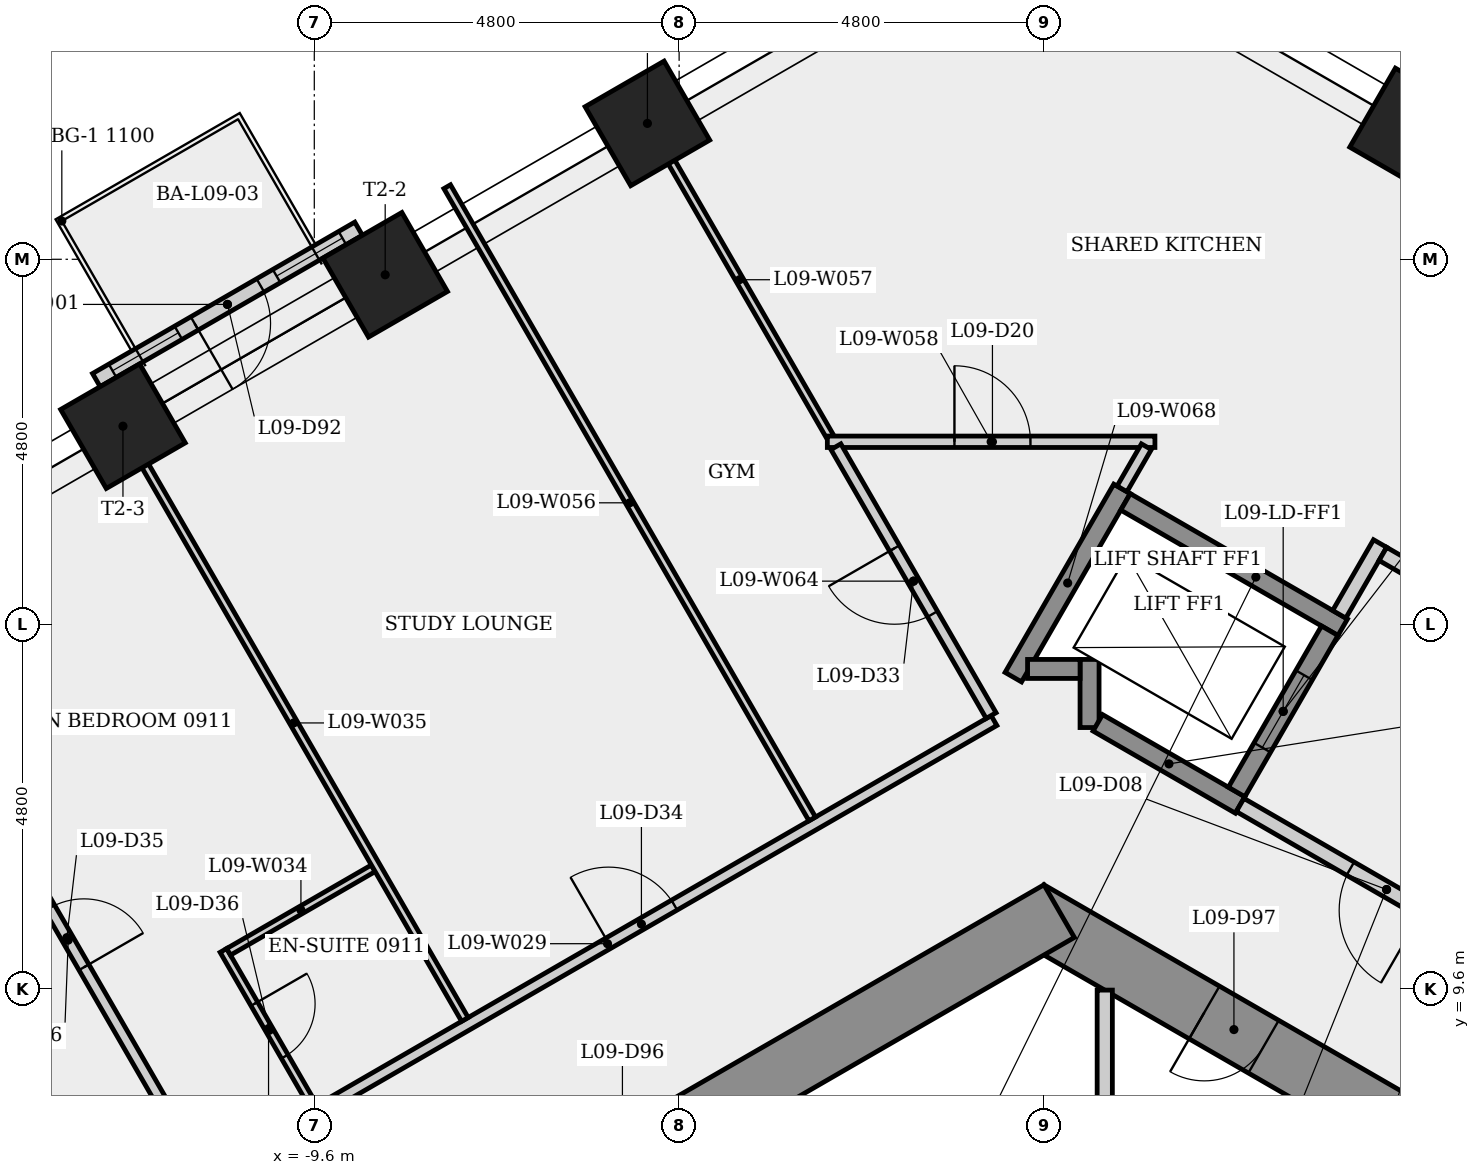
"""IFC4 building model, lengths in metres.
Left out: names, types, materials, properties, quantities, classifications, styles, units other than length and angle.
Written with IfcOpenShell. Run it as: python <this file> out.ifc"""

import sys

from ifc_helpers import new_model, si_unit, direction, frame, frame_2d, origin, origin_2d, place, context, subcontext, project, spatial, rectangle, extrude, element, fill, save


model = new_model("IFC4")
c1 = context("Model", 3, precision=1e-05, world=origin(), true_north=direction((0.0, 1.0)))
c2 = subcontext(c1, "Body", "Model", "MODEL_VIEW")
j1 = project(units=[si_unit("LENGTHUNIT", "METRE"), si_unit("PLANEANGLEUNIT", "RADIAN")], contexts=[c1])
p1 = place(None, origin())
s1 = spatial("IfcSite", under=j1, at=p1, CompositionType="ELEMENT")
p2 = place(p1, origin())
s2 = spatial("IfcBuilding", under=s1, at=p2, CompositionType="ELEMENT")
p3 = place(p2, frame((0.0, 0.0, 39.1)))
s3 = spatial("IfcBuildingStorey", under=s2, at=p3, CompositionType="ELEMENT", Elevation=39.1)
p4 = place(p3, frame((9.3, 5.138, 0.0), z_axis=(0.0, 0.0, 1.0), x_axis=(-0.866023993627, 0.500002442456, 0.0)))
e1 = element("IfcWall", 1, at=p4, inside=s3, PredefinedType="SHEAR", context=c2, shape_type="SweptSolid", body=[
    extrude(rectangle(XDim=10.97, YDim=0.8, at=frame_2d((5.485, 0.0))), origin(), (0.0, 0.0, 1.0), 3.4),
])
p5 = place(p4, frame((7.403, 0.0, 0.0)))
e2 = element("IfcOpeningElement", 2, at=p5, cuts=e1, PredefinedType="OPENING", context=c2, shape_type="SweptSolid", body=[
    extrude(rectangle(XDim=0.9, YDim=2.1, at=frame_2d((0.45, 1.05))), frame((0.0, 0.41, 0.0), z_axis=(0.0, -1.0, 0.0), x_axis=(1.0, 0.0, 0.0)), (0.0, 0.0, 1.0), 0.82),
])
p6 = place(p4, frame((0.78, 0.0, 0.0)))
e3 = element("IfcOpeningElement", 3, at=p6, cuts=e1, PredefinedType="OPENING", context=c2, shape_type="SweptSolid", body=[
    extrude(rectangle(XDim=0.9, YDim=2.1, at=frame_2d((0.45, 1.05))), frame((0.0, 0.41, 0.0), z_axis=(0.0, -1.0, 0.0), x_axis=(1.0, 0.0, 0.0)), (0.0, 0.0, 1.0), 0.82),
])
p7 = place(p3, frame((0.2, 10.623, 0.0), z_axis=(0.0, 0.0, 1.0), x_axis=(-0.866023993627, -0.500002442456, 0.0)))
e4 = element("IfcWall", 4, at=p7, inside=s3, PredefinedType="SHEAR", context=c2, shape_type="SweptSolid", body=[
    extrude(rectangle(XDim=10.97, YDim=0.8, at=frame_2d((5.485, 0.0))), origin(), (0.0, 0.0, 1.0), 3.4),
])
p8 = place(p7, frame((6.185, 0.0, 0.0)))
e5 = element("IfcOpeningElement", 5, at=p8, cuts=e4, PredefinedType="OPENING", context=c2, shape_type="SweptSolid", body=[
    extrude(rectangle(XDim=0.9, YDim=2.1, at=frame_2d((0.45, 1.05))), frame((0.0, 0.41, 0.0), z_axis=(0.0, -1.0, 0.0), x_axis=(1.0, 0.0, 0.0)), (0.0, 0.0, 1.0), 0.82),
])
for number, where, z_axis, x_axis in (
    (6, (4.843, 20.895, 0.0), (0.0, 0.0, 1.0), (0.5, 0.866, 0.0)),
    (7, (-5.217, 20.988, 0.0), (0.0, 0.0, 1.0), (-0.5, 0.866, 0.0)),
    (8, (-8.667, 18.996, 0.0), (0.0, 0.0, 1.0), (-0.5, 0.866, 0.0)),
    (9, (-12.117, 17.004, 0.0), (0.0, 0.0, 1.0), (-0.5, 0.866, 0.0)),
):
    element("IfcColumn", number, at=place(p3, frame(where, z_axis=z_axis, x_axis=x_axis)), inside=s3, PredefinedType="COLUMN", context=c2, shape_type="SweptSolid", body=[
        extrude(rectangle(XDim=1.2, YDim=1.2, at=origin_2d()), origin(), (0.0, 0.0, 1.0), 3.4),
    ])
p9 = place(p3, frame((-9.017, 19.602, 0.0), z_axis=(0.0, 0.0, 1.0), x_axis=(-0.866017214255, -0.500014184414, 0.0)))
e10 = element("IfcWall", 10, at=p9, inside=s3, PredefinedType="SOLIDWALL", context=c2, shape_type="SweptSolid", body=[
    extrude(rectangle(XDim=3.984, YDim=0.2, at=frame_2d((1.992, 0.0))), origin(), (0.0, 0.0, 1.0), 3.4),
])
p10 = place(p9, frame((1.492, 0.0, 0.0)))
e11 = element("IfcOpeningElement", 11, at=p10, cuts=e10, PredefinedType="OPENING", context=c2, shape_type="SweptSolid", body=[
    extrude(rectangle(XDim=1.0, YDim=2.4, at=frame_2d((0.5, 1.2))), frame((0.0, 0.11, 0.0), z_axis=(0.0, -1.0, 0.0), x_axis=(1.0, 0.0, 0.0)), (0.0, 0.0, 1.0), 0.22),
])
p11 = place(p9, frame((0.246, 0.0, 0.9)))
e12 = element("IfcOpeningElement", 12, at=p11, cuts=e10, PredefinedType="OPENING", context=c2, shape_type="SweptSolid", body=[
    extrude(rectangle(XDim=1.0, YDim=1.5, at=frame_2d((0.5, 0.75))), frame((0.0, 0.11, 0.0), z_axis=(0.0, -1.0, 0.0), x_axis=(1.0, 0.0, 0.0)), (0.0, 0.0, 1.0), 0.22),
])
p12 = place(p9, frame((2.738, 0.0, 0.9)))
e13 = element("IfcOpeningElement", 13, at=p12, cuts=e10, PredefinedType="OPENING", context=c2, shape_type="SweptSolid", body=[
    extrude(rectangle(XDim=1.0, YDim=1.5, at=frame_2d((0.5, 0.75))), frame((0.0, 0.11, 0.0), z_axis=(0.0, -1.0, 0.0), x_axis=(1.0, 0.0, 0.0)), (0.0, 0.0, 1.0), 0.22),
])
p13 = place(p3, frame((-14.509, 13.138, 0.0), z_axis=(0.0, 0.0, 1.0), x_axis=(0.499975272495, -0.866039679746, 0.0)))
e14 = element("IfcWall", 14, at=p13, inside=s3, PredefinedType="PARTITIONING", context=c2, shape_type="SweptSolid", body=[
    extrude(rectangle(XDim=6.687, YDim=0.15, at=frame_2d((3.344, 0.0))), origin(), (0.0, 0.0, 1.0), 3.05),
])
p14 = place(p13, frame((2.856, 0.0, 0.0)))
e15 = element("IfcOpeningElement", 15, at=p14, cuts=e14, PredefinedType="OPENING", context=c2, shape_type="SweptSolid", body=[
    extrude(rectangle(XDim=0.9, YDim=2.1, at=frame_2d((0.45, 1.05))), frame((0.0, 0.085, 0.0), z_axis=(0.0, -1.0, 0.0), x_axis=(1.0, 0.0, 0.0)), (0.0, 0.0, 1.0), 0.17),
])
p15 = place(p3, frame((-10.828, 7.259, 0.0), z_axis=(0.0, 0.0, 1.0), x_axis=(0.866023917287, 0.50000257468, 0.0)))
e16 = element("IfcWall", 16, at=p15, inside=s3, PredefinedType="PARTITIONING", context=c2, shape_type="SweptSolid", body=[
    extrude(rectangle(XDim=11.744, YDim=0.15, at=frame_2d((5.872, 0.0))), origin(), (0.0, 0.0, 1.0), 3.05),
])
p16 = place(p15, frame((5.887, 0.0, 0.0)))
e17 = element("IfcOpeningElement", 17, at=p16, cuts=e16, PredefinedType="OPENING", context=c2, shape_type="SweptSolid", body=[
    extrude(rectangle(XDim=1.0, YDim=2.1, at=frame_2d((0.5, 1.05))), frame((0.0, 0.085, 0.0), z_axis=(0.0, -1.0, 0.0), x_axis=(1.0, 0.0, 0.0)), (0.0, 0.0, 1.0), 0.17),
])
p17 = place(p3, frame((-10.796, 10.106, 0.0), z_axis=(0.0, 0.0, 1.0), x_axis=(0.499986429846, -0.866033238375, 0.0)))
e18 = element("IfcWall", 18, at=p17, inside=s3, PredefinedType="PARTITIONING", context=c2, shape_type="SweptSolid", body=[
    extrude(rectangle(XDim=2.375, YDim=0.1, at=frame_2d((1.188, 0.0))), origin(), (0.0, 0.0, 1.0), 3.05),
])
p18 = place(p17, frame((0.812, 0.0, 0.0)))
e19 = element("IfcOpeningElement", 19, at=p18, cuts=e18, PredefinedType="OPENING", context=c2, shape_type="SweptSolid", body=[
    extrude(rectangle(XDim=0.8, YDim=2.1, at=frame_2d((0.4, 1.05))), frame((0.0, 0.06, 0.0), z_axis=(0.0, -1.0, 0.0), x_axis=(1.0, 0.0, 0.0)), (0.0, 0.0, 1.0), 0.12),
])
p19 = place(p3, frame((-8.824, 11.187, 0.0), z_axis=(0.0, 0.0, 1.0), x_axis=(-0.866046828231, -0.499962889934, 0.0)))
e20 = element("IfcWall", 20, at=p19, inside=s3, PredefinedType="PARTITIONING", context=c2, shape_type="SweptSolid", body=[
    extrude(rectangle(XDim=2.198, YDim=0.1, at=frame_2d((1.099, 0.0))), origin(), (0.0, 0.0, 1.0), 3.05),
])
p20 = place(p3, frame((-12.123, 17.0, 0.0), z_axis=(0.0, 0.0, 1.0), x_axis=(0.500009404554, -0.866019973994, 0.0)))
e21 = element("IfcWall", 21, at=p20, inside=s3, PredefinedType="PARTITIONING", context=c2, shape_type="SweptSolid", body=[
    extrude(rectangle(XDim=9.01, YDim=0.1, at=frame_2d((4.505, 0.0))), origin(), (0.0, 0.0, 1.0), 3.05),
])
p21 = place(p3, frame((-3.049, 11.836, 0.0), z_axis=(0.0, 0.0, 1.0), x_axis=(-0.500018000043, 0.866015011206, 0.0)))
e22 = element("IfcWall", 22, at=p21, inside=s3, PredefinedType="PARTITIONING", context=c2, shape_type="SweptSolid", body=[
    extrude(rectangle(XDim=9.606, YDim=0.1, at=frame_2d((4.803, 0.0))), origin(), (0.0, 0.0, 1.0), 3.05),
])
p22 = place(p3, frame((-2.812, 16.864, 0.0), z_axis=(0.0, 0.0, 1.0), x_axis=(-0.49998363006, 0.866034854768, 0.0)))
e23 = element("IfcWall", 23, at=p22, inside=s3, PredefinedType="PARTITIONING", context=c2, shape_type="SweptSolid", body=[
    extrude(rectangle(XDim=4.774, YDim=0.1, at=frame_2d((2.387, 0.0))), origin(), (0.0, 0.0, 1.0), 3.05),
])
p23 = place(p3, frame((-2.85, 16.799, 0.0), z_axis=(0.0, 0.0, 1.0), x_axis=(1.0, 0.0, 0.0)))
e24 = element("IfcWall", 24, at=p23, inside=s3, PredefinedType="PARTITIONING", context=c2, shape_type="SweptSolid", body=[
    extrude(rectangle(XDim=4.31, YDim=0.15, at=frame_2d((2.155, 0.0))), origin(), (0.0, 0.0, 1.0), 3.05),
])
p24 = place(p23, frame((1.672, 0.0, 0.0)))
e25 = element("IfcOpeningElement", 25, at=p24, cuts=e24, PredefinedType="OPENING", context=c2, shape_type="SweptSolid", body=[
    extrude(rectangle(XDim=1.0, YDim=2.1, at=frame_2d((0.5, 1.05))), frame((0.0, 0.085, 0.0), z_axis=(0.0, -1.0, 0.0), x_axis=(1.0, 0.0, 0.0)), (0.0, 0.0, 1.0), 0.17),
])
p25 = place(p3, frame((-0.695, 13.196, 0.0), z_axis=(0.0, 0.0, 1.0), x_axis=(-0.49996389635, 0.866046247233, 0.0)))
e26 = element("IfcWall", 26, at=p25, inside=s3, PredefinedType="PARTITIONING", context=c2, shape_type="SweptSolid", body=[
    extrude(rectangle(XDim=4.085, YDim=0.15, at=frame_2d((2.042, 0.0))), origin(), (0.0, 0.0, 1.0), 3.05),
])
p26 = place(p25, frame((1.542, 0.0, 0.0)))
e27 = element("IfcOpeningElement", 27, at=p26, cuts=e26, PredefinedType="OPENING", context=c2, shape_type="SweptSolid", body=[
    extrude(rectangle(XDim=1.0, YDim=2.1, at=frame_2d((0.5, 1.05))), frame((0.0, 0.085, 0.0), z_axis=(0.0, -1.0, 0.0), x_axis=(1.0, 0.0, 0.0)), (0.0, 0.0, 1.0), 0.17),
])
p27 = place(p3, frame((-0.403, 13.702, 0.0), z_axis=(0.0, 0.0, 1.0), x_axis=(0.499976111731, 0.866039195244, 0.0)))
e28 = element("IfcWall", 28, at=p27, inside=s3, PredefinedType="SHEAR", context=c2, shape_type="SweptSolid", body=[
    extrude(rectangle(XDim=2.861, YDim=0.25, at=frame_2d((1.43, 0.0))), origin(), (0.0, 0.0, 1.0), 3.05),
])
p28 = place(p3, frame((0.6, 13.039, 0.0), z_axis=(0.0, 0.0, 1.0), x_axis=(0.0, 1.0, 0.0)))
e29 = element("IfcWall", 29, at=p28, inside=s3, PredefinedType="SHEAR", context=c2, shape_type="SweptSolid", body=[
    extrude(rectangle(XDim=0.896, YDim=0.25, at=frame_2d((0.448, 0.0))), origin(), (0.0, 0.0, 1.0), 3.05),
])
p29 = place(p3, frame((0.475, 13.81, 0.0), z_axis=(0.0, 0.0, 1.0), x_axis=(-1.0, 0.0, 0.0)))
e30 = element("IfcWall", 30, at=p29, inside=s3, PredefinedType="SHEAR", context=c2, shape_type="SweptSolid", body=[
    extrude(rectangle(XDim=0.691, YDim=0.25, at=frame_2d((0.345, 0.0))), origin(), (0.0, 0.0, 1.0), 3.4),
])
p30 = place(p3, frame((0.8, 9.584, 0.0), z_axis=(0.0, 0.0, 1.0), x_axis=(0.0, -1.0, 0.0)))
e31 = element("IfcWall", 31, at=p30, inside=s3, PredefinedType="PARTITIONING", context=c2, shape_type="SweptSolid", body=[
    extrude(rectangle(XDim=4.309, YDim=0.2, at=frame_2d((2.155, 0.0))), origin(), (0.0, 0.0, 1.0), 3.05),
])
p31 = place(p3, frame((1.073, 16.008, 0.0), z_axis=(0.0, 0.0, 1.0), x_axis=(0.866040211805, -0.499974350878, 0.0)))
e32 = element("IfcWall", 32, at=p31, inside=s3, PredefinedType="SHEAR", context=c2, shape_type="SweptSolid", body=[
    extrude(rectangle(XDim=3.3, YDim=0.25, at=frame_2d((1.65, 0.0))), origin(), (0.0, 0.0, 1.0), 3.05),
])
p32 = place(p3, frame((1.347, 16.734, 0.0), z_axis=(0.0, 0.0, 1.0), x_axis=(-0.499909361484, -0.866077727632, 0.0)))
e33 = element("IfcWall", 33, at=p32, inside=s3, PredefinedType="PARTITIONING", context=c2, shape_type="SweptSolid", body=[
    extrude(rectangle(XDim=0.641, YDim=0.15, at=frame_2d((0.32, 0.0))), origin(), (0.0, 0.0, 1.0), 3.05),
])
p33 = place(p3, frame((2.581, 12.02, 0.0), z_axis=(0.0, 0.0, 1.0), x_axis=(-0.86603892542, 0.499976579108, 0.0)))
e34 = element("IfcWall", 34, at=p33, inside=s3, PredefinedType="SHEAR", context=c2, shape_type="SweptSolid", body=[
    extrude(rectangle(XDim=2.162, YDim=0.25, at=frame_2d((1.081, 0.0))), origin(), (0.0, 0.0, 1.0), 3.05),
])
p34 = place(p3, frame((2.535, 12.191, 0.0), z_axis=(0.0, 0.0, 1.0), x_axis=(0.500061746146, 0.865989751695, 0.0)))
e35 = element("IfcWall", 35, at=p34, inside=s3, PredefinedType="SHEAR", context=c2, shape_type="SweptSolid", body=[
    extrude(rectangle(XDim=2.45, YDim=0.25, at=frame_2d((1.225, 0.0))), origin(), (0.0, 0.0, 1.0), 3.4),
])
p35 = place(p34, frame((0.675, 0.0, 0.0)))
e36 = element("IfcOpeningElement", 36, at=p35, cuts=e35, PredefinedType="OPENING", context=c2, shape_type="SweptSolid", body=[
    extrude(rectangle(XDim=1.1, YDim=2.1, at=frame_2d((0.55, 1.05))), frame((0.0, 0.135, 0.0), z_axis=(0.0, -1.0, 0.0), x_axis=(1.0, 0.0, 0.0)), (0.0, 0.0, 1.0), 0.27),
])
p36 = place(p3, frame((3.885, 14.529, 0.0), z_axis=(0.0, 0.0, 1.0), x_axis=(0.499997628298, 0.866026773083, 0.0)))
e37 = element("IfcWall", 37, at=p36, inside=s3, PredefinedType="PARTITIONING", context=c2, shape_type="SweptSolid", body=[
    extrude(rectangle(XDim=1.075, YDim=0.2, at=frame_2d((0.538, 0.0))), origin(), (0.0, 0.0, 1.0), 3.05),
])
p37 = place(p3, frame((4.459, 15.323, 0.0), z_axis=(0.0, 0.0, 1.0), x_axis=(0.866016039709, -0.500016218704, 0.0)))
e38 = element("IfcWall", 38, at=p37, inside=s3, PredefinedType="PARTITIONING", context=c2, shape_type="SweptSolid", body=[
    extrude(rectangle(XDim=4.7, YDim=0.2, at=frame_2d((2.35, 0.0))), origin(), (0.0, 0.0, 1.0), 3.05),
])
p38 = place(p3, frame((6.435, 9.795, 0.0), z_axis=(0.0, 0.0, 1.0), x_axis=(-0.866012907634, 0.500021643343, 0.0)))
e39 = element("IfcWall", 39, at=p38, inside=s3, PredefinedType="PARTITIONING", context=c2, shape_type="SweptSolid", body=[
    extrude(rectangle(XDim=4.45, YDim=0.2, at=frame_2d((2.225, 0.0))), origin(), (0.0, 0.0, 1.0), 3.05),
])
p39 = place(p38, frame((1.675, 0.0, 0.0)))
e40 = element("IfcOpeningElement", 40, at=p39, cuts=e39, PredefinedType="OPENING", context=c2, shape_type="SweptSolid", body=[
    extrude(rectangle(XDim=1.1, YDim=2.1, at=frame_2d((0.55, 1.05))), frame((0.0, 0.11, 0.0), z_axis=(0.0, -1.0, 0.0), x_axis=(1.0, 0.0, 0.0)), (0.0, 0.0, 1.0), 0.22),
])
p40 = place(p10, origin())
e41 = element("IfcDoor", 41, at=p40, inside=s3, OperationType="SINGLE_SWING_RIGHT", PredefinedType="DOOR", context=c2, shape_type="SweptSolid", body=[
    extrude(rectangle(XDim=1.0, YDim=2.4, at=frame_2d((0.5, 1.2))), frame((0.0, 0.025, 0.0), z_axis=(0.0, -1.0, 0.0), x_axis=(1.0, 0.0, 0.0)), (0.0, 0.0, 1.0), 0.05),
])
fill(e11, e41)
p41 = place(p11, origin())
e42 = element("IfcWindow", 42, at=p41, inside=s3, PartitioningType="SINGLE_PANEL", PredefinedType="WINDOW", context=c2, shape_type="SweptSolid", body=[
    extrude(rectangle(XDim=1.0, YDim=1.5, at=frame_2d((0.5, 0.75))), frame((0.0, 0.03, 0.0), z_axis=(0.0, -1.0, 0.0), x_axis=(1.0, 0.0, 0.0)), (0.0, 0.0, 1.0), 0.06),
])
fill(e12, e42)
p42 = place(p12, origin())
e43 = element("IfcWindow", 43, at=p42, inside=s3, PartitioningType="SINGLE_PANEL", PredefinedType="WINDOW", context=c2, shape_type="SweptSolid", body=[
    extrude(rectangle(XDim=1.0, YDim=1.5, at=frame_2d((0.5, 0.75))), frame((0.0, 0.03, 0.0), z_axis=(0.0, -1.0, 0.0), x_axis=(1.0, 0.0, 0.0)), (0.0, 0.0, 1.0), 0.06),
])
fill(e13, e43)
p43 = place(p39, origin())
e44 = element("IfcDoor", 44, at=p43, inside=s3, OperationType="SINGLE_SWING_LEFT", PredefinedType="DOOR", context=c2, shape_type="SweptSolid", body=[
    extrude(rectangle(XDim=1.1, YDim=2.1, at=frame_2d((0.55, 1.05))), frame((0.0, 0.025, 0.0), z_axis=(0.0, -1.0, 0.0), x_axis=(1.0, 0.0, 0.0)), (0.0, 0.0, 1.0), 0.05),
])
fill(e40, e44)
p44 = place(p35, origin())
e45 = element("IfcDoor", 45, at=p44, inside=s3, OperationType="SLIDING_TO_LEFT", PredefinedType="DOOR", context=c2, shape_type="SweptSolid", body=[
    extrude(rectangle(XDim=1.1, YDim=2.1, at=frame_2d((0.55, 1.05))), frame((0.0, 0.025, 0.0), z_axis=(0.0, -1.0, 0.0), x_axis=(1.0, 0.0, 0.0)), (0.0, 0.0, 1.0), 0.05),
])
fill(e36, e45)
p45 = place(p24, origin())
e46 = element("IfcDoor", 46, at=p45, inside=s3, OperationType="SINGLE_SWING_LEFT", PredefinedType="DOOR", context=c2, shape_type="SweptSolid", body=[
    extrude(rectangle(XDim=1.0, YDim=2.1, at=frame_2d((0.5, 1.05))), frame((0.0, 0.025, 0.0), z_axis=(0.0, -1.0, 0.0), x_axis=(1.0, 0.0, 0.0)), (0.0, 0.0, 1.0), 0.05),
])
fill(e25, e46)
p46 = place(p26, origin())
e47 = element("IfcDoor", 47, at=p46, inside=s3, OperationType="SINGLE_SWING_RIGHT", PredefinedType="DOOR", context=c2, shape_type="SweptSolid", body=[
    extrude(rectangle(XDim=1.0, YDim=2.1, at=frame_2d((0.5, 1.05))), frame((0.0, 0.025, 0.0), z_axis=(0.0, -1.0, 0.0), x_axis=(1.0, 0.0, 0.0)), (0.0, 0.0, 1.0), 0.05),
])
fill(e27, e47)
p47 = place(p16, origin())
e48 = element("IfcDoor", 48, at=p47, inside=s3, OperationType="SINGLE_SWING_LEFT", PredefinedType="DOOR", context=c2, shape_type="SweptSolid", body=[
    extrude(rectangle(XDim=1.0, YDim=2.1, at=frame_2d((0.5, 1.05))), frame((0.0, 0.025, 0.0), z_axis=(0.0, -1.0, 0.0), x_axis=(1.0, 0.0, 0.0)), (0.0, 0.0, 1.0), 0.05),
])
fill(e17, e48)
p48 = place(p14, origin())
e49 = element("IfcDoor", 49, at=p48, inside=s3, OperationType="SINGLE_SWING_RIGHT", PredefinedType="DOOR", context=c2, shape_type="SweptSolid", body=[
    extrude(rectangle(XDim=0.9, YDim=2.1, at=frame_2d((0.45, 1.05))), frame((0.0, 0.025, 0.0), z_axis=(0.0, -1.0, 0.0), x_axis=(1.0, 0.0, 0.0)), (0.0, 0.0, 1.0), 0.05),
])
fill(e15, e49)
p49 = place(p18, origin())
e50 = element("IfcDoor", 50, at=p49, inside=s3, OperationType="SINGLE_SWING_LEFT", PredefinedType="DOOR", context=c2, shape_type="SweptSolid", body=[
    extrude(rectangle(XDim=0.8, YDim=2.1, at=frame_2d((0.4, 1.05))), frame((0.0, 0.025, 0.0), z_axis=(0.0, -1.0, 0.0), x_axis=(1.0, 0.0, 0.0)), (0.0, 0.0, 1.0), 0.05),
])
fill(e19, e50)
p50 = place(p5, origin())
e51 = element("IfcDoor", 51, at=p50, inside=s3, OperationType="SINGLE_SWING_RIGHT", PredefinedType="DOOR", context=c2, shape_type="SweptSolid", body=[
    extrude(rectangle(XDim=0.9, YDim=2.1, at=frame_2d((0.45, 1.05))), frame((0.0, 0.025, 0.0), z_axis=(0.0, -1.0, 0.0), x_axis=(1.0, 0.0, 0.0)), (0.0, 0.0, 1.0), 0.05),
])
fill(e2, e51)
save(model, sys.argv[1])
